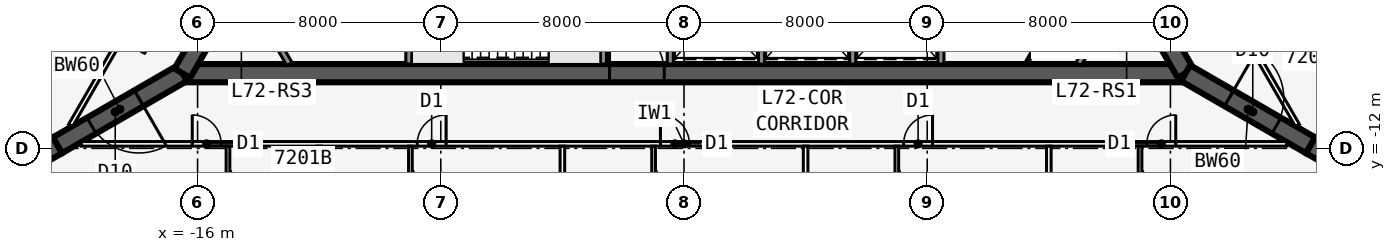
"""IFC4 building model, lengths in metres.
Left out: names, types, materials, properties, quantities, classifications, styles, units other than length and angle.
Written with IfcOpenShell. Run it as: python <this file> out.ifc"""

import sys

from ifc_helpers import new_model, si_unit, direction, frame, frame_2d, origin, place, context, subcontext, project, spatial, polyline, rectangle, outline, extrude, element, fill, save


model = new_model("IFC4")
c1 = context("Model", 3, precision=1e-05, world=origin(), true_north=direction((0.0, 1.0)))
c2 = subcontext(c1, "Body", "Model", "MODEL_VIEW")
j1 = project(units=[si_unit("LENGTHUNIT", "METRE"), si_unit("PLANEANGLEUNIT", "RADIAN")], contexts=[c1])
p1 = place(None, origin())
s1 = spatial("IfcSite", under=j1, at=p1, CompositionType="ELEMENT")
p2 = place(p1, origin())
s2 = spatial("IfcBuilding", under=s1, at=p2, CompositionType="ELEMENT")
p3 = place(p2, frame((0.0, 0.0, 271.7)))
s3 = spatial("IfcBuildingStorey", under=s2, at=p3, CompositionType="ELEMENT", Elevation=271.7)
p4 = place(p3, frame((-16.5, -9.526, 0.0), z_axis=(0.0, 0.0, 1.0), x_axis=(1.0, 0.0, 0.0)))
e1 = element("IfcWall", 1, at=p4, inside=s3, PredefinedType="SHEAR", context=c2, shape_type="SweptSolid", body=[
    extrude(rectangle(XDim=33.0, YDim=0.6, at=frame_2d((16.5, 0.0))), origin(), (0.0, 0.0, 1.0), 3.6),
])
p5 = place(p4, frame((14.05, 0.0, 0.0)))
e2 = element("IfcOpeningElement", 2, at=p5, cuts=e1, PredefinedType="OPENING", context=c2, shape_type="SweptSolid", body=[
    extrude(rectangle(XDim=1.8, YDim=2.13, at=frame_2d((0.9, 1.065))), frame((0.0, 0.31, 0.0), z_axis=(0.0, -1.0, 0.0), x_axis=(1.0, 0.0, 0.0)), (0.0, 0.0, 1.0), 0.62),
])
p6 = place(p3, frame((-9.05, -5.951, 0.0), z_axis=(0.0, 0.0, 1.0), x_axis=(0.0, -1.0, 0.0)))
e3 = element("IfcWall", 3, at=p6, inside=s3, PredefinedType="SOLIDWALL", context=c2, shape_type="SweptSolid", body=[
    extrude(rectangle(XDim=3.275, YDim=0.2, at=frame_2d((1.637, 0.0))), origin(), (0.0, 0.0, 1.0), 3.35),
])
p7 = place(p3, frame((-2.65, -5.951, 0.0), z_axis=(0.0, 0.0, 1.0), x_axis=(0.0, -1.0, 0.0)))
e4 = element("IfcWall", 4, at=p7, inside=s3, PredefinedType="SOLIDWALL", context=c2, shape_type="SweptSolid", body=[
    extrude(rectangle(XDim=3.275, YDim=0.2, at=frame_2d((1.637, 0.0))), origin(), (0.0, 0.0, 1.0), 3.35),
])
p8 = place(p7, frame((1.675, 0.0, 0.0)))
e5 = element("IfcOpeningElement", 5, at=p8, cuts=e4, PredefinedType="OPENING", context=c2, shape_type="SweptSolid", body=[
    extrude(rectangle(XDim=1.0, YDim=2.13, at=frame_2d((0.5, 1.065))), frame((0.0, 0.11, 0.0), z_axis=(0.0, -1.0, 0.0), x_axis=(1.0, 0.0, 0.0)), (0.0, 0.0, 1.0), 0.22),
])
for number, where, z_axis, x_axis in (
    (6, (-0.45, -5.951, 0.0), (0.0, 0.0, 1.0), (0.0, -1.0, 0.0)),
    (7, (2.55, -5.951, 0.0), (0.0, 0.0, 1.0), (0.0, -1.0, 0.0)),
    (8, (5.55, -5.951, 0.0), (0.0, 0.0, 1.0), (0.0, -1.0, 0.0)),
    (9, (8.45, -5.951, 0.0), (0.0, 0.0, 1.0), (0.0, -1.0, 0.0)),
):
    element("IfcWall", number, at=place(p3, frame(where, z_axis=z_axis, x_axis=x_axis)), inside=s3, PredefinedType="SOLIDWALL", context=c2, shape_type="SweptSolid", body=[
        extrude(rectangle(XDim=3.275, YDim=0.2, at=frame_2d((1.637, 0.0))), origin(), (0.0, 0.0, 1.0), 3.35),
    ])
p9 = place(p3, frame((16.5, -9.526, 0.0), z_axis=(0.0, 0.0, 1.0), x_axis=(-0.499999749417, 0.866025548458, 0.0)))
e10 = element("IfcWall", 10, at=p9, inside=s3, PredefinedType="SHEAR", context=c2, shape_type="SweptSolid", body=[
    extrude(rectangle(XDim=33.0, YDim=0.6, at=frame_2d((16.5, 0.0))), origin(), (0.0, 0.0, 1.0), 3.6),
])
p10 = place(p9, frame((14.15, 0.0, 0.0)))
e11 = element("IfcOpeningElement", 11, at=p10, cuts=e10, PredefinedType="OPENING", context=c2, shape_type="SweptSolid", body=[
    extrude(rectangle(XDim=1.8, YDim=2.13, at=frame_2d((0.9, 1.065))), frame((0.0, 0.31, 0.0), z_axis=(0.0, -1.0, 0.0), x_axis=(1.0, 0.0, 0.0)), (0.0, 0.0, 1.0), 0.62),
])
p11 = place(p9, frame((12.6, 0.0, 0.0)))
e12 = element("IfcOpeningElement", 12, at=p11, cuts=e10, PredefinedType="OPENING", context=c2, shape_type="SweptSolid", body=[
    extrude(rectangle(XDim=1.0, YDim=2.13, at=frame_2d((0.5, 1.065))), frame((0.0, 0.31, 0.0), z_axis=(0.0, -1.0, 0.0), x_axis=(1.0, 0.0, 0.0)), (0.0, 0.0, 1.0), 0.62),
])
p12 = place(p3, frame((0.0, 19.052, 0.0), z_axis=(0.0, 0.0, 1.0), x_axis=(-0.499999749417, -0.866025548458, 0.0)))
e13 = element("IfcWall", 13, at=p12, inside=s3, PredefinedType="SHEAR", context=c2, shape_type="SweptSolid", body=[
    extrude(rectangle(XDim=33.0, YDim=0.6, at=frame_2d((16.5, 0.0))), origin(), (0.0, 0.0, 1.0), 3.6),
])
p13 = place(p12, frame((14.15, 0.0, 0.0)))
e14 = element("IfcOpeningElement", 14, at=p13, cuts=e13, PredefinedType="OPENING", context=c2, shape_type="SweptSolid", body=[
    extrude(rectangle(XDim=1.8, YDim=2.13, at=frame_2d((0.9, 1.065))), frame((0.0, 0.31, 0.0), z_axis=(0.0, -1.0, 0.0), x_axis=(1.0, 0.0, 0.0)), (0.0, 0.0, 1.0), 0.62),
])
p14 = place(p12, frame((12.6, 0.0, 0.0)))
e15 = element("IfcOpeningElement", 15, at=p14, cuts=e13, PredefinedType="OPENING", context=c2, shape_type="SweptSolid", body=[
    extrude(rectangle(XDim=1.0, YDim=2.13, at=frame_2d((0.5, 1.065))), frame((0.0, 0.31, 0.0), z_axis=(0.0, -1.0, 0.0), x_axis=(1.0, 0.0, 0.0)), (0.0, 0.0, 1.0), 0.62),
])
p15 = place(p3, frame((16.5, -9.526, 0.0), z_axis=(0.0, 0.0, 1.0), x_axis=(0.866031398331, -0.499989616998, 0.0)))
e16 = element("IfcWall", 16, at=p15, inside=s3, PredefinedType="SHEAR", context=c2, shape_type="SweptSolid", body=[
    extrude(rectangle(XDim=4.746, YDim=0.6, at=frame_2d((2.373, 0.0))), origin(), (0.0, 0.0, 1.0), 3.6),
])
p16 = place(p15, frame((1.65, 0.0, 0.0)))
e17 = element("IfcOpeningElement", 17, at=p16, cuts=e16, PredefinedType="OPENING", context=c2, shape_type="SweptSolid", body=[
    extrude(rectangle(XDim=1.8, YDim=2.13, at=frame_2d((0.9, 1.065))), frame((0.0, 0.31, 0.0), z_axis=(0.0, -1.0, 0.0), x_axis=(1.0, 0.0, 0.0)), (0.0, 0.0, 1.0), 0.62),
])
p17 = place(p3, frame((20.61, -11.899, 0.0), z_axis=(0.0, 0.0, 1.0), x_axis=(0.866009537788, -0.500027479704, 0.0)))
e18 = element("IfcWall", 18, at=p17, inside=s3, PredefinedType="SHEAR", context=c2, shape_type="SweptSolid", body=[
    extrude(rectangle(XDim=1.155, YDim=0.6, at=frame_2d((0.577, 0.0))), origin(), (0.0, 0.0, 1.0), 3.6),
])
p18 = place(p3, frame((-16.5, -9.526, 0.0), z_axis=(0.0, 0.0, 1.0), x_axis=(-0.866031398331, -0.499989616998, 0.0)))
e19 = element("IfcWall", 19, at=p18, inside=s3, PredefinedType="SHEAR", context=c2, shape_type="SweptSolid", body=[
    extrude(rectangle(XDim=4.746, YDim=0.6, at=frame_2d((2.373, 0.0))), origin(), (0.0, 0.0, 1.0), 3.6),
])
p19 = place(p18, frame((1.65, 0.0, 0.0)))
e20 = element("IfcOpeningElement", 20, at=p19, cuts=e19, PredefinedType="OPENING", context=c2, shape_type="SweptSolid", body=[
    extrude(rectangle(XDim=1.8, YDim=2.13, at=frame_2d((0.9, 1.065))), frame((0.0, 0.31, 0.0), z_axis=(0.0, -1.0, 0.0), x_axis=(1.0, 0.0, 0.0)), (0.0, 0.0, 1.0), 0.62),
])
p20 = place(p3, frame((-20.61, -11.899, 0.0), z_axis=(0.0, 0.0, 1.0), x_axis=(-0.866009537788, -0.500027479704, 0.0)))
e21 = element("IfcWall", 21, at=p20, inside=s3, PredefinedType="SHEAR", context=c2, shape_type="SweptSolid", body=[
    extrude(rectangle(XDim=1.155, YDim=0.6, at=frame_2d((0.577, 0.0))), origin(), (0.0, 0.0, 1.0), 3.6),
])
p21 = place(p3, frame((18.46, -15.924, 0.0), z_axis=(0.0, 0.0, 1.0), x_axis=(0.707081252484, 0.707132308968, 0.0)))
e22 = element("IfcWall", 22, at=p21, inside=s3, PredefinedType="SOLIDWALL", context=c2, shape_type="SweptSolid", body=[
    extrude(outline(polyline([(4.782, 0.225), (4.723, 0.225), (4.375, 0.132), (4.351, 0.225), (0.0, 0.225), (0.0, -0.225), (4.782, -0.225), (4.782, 0.225)])), origin(), (0.0, 0.0, 1.0), 3.35),
])
p22 = place(p21, frame((0.75, 0.0, 0.45)))
e23 = element("IfcOpeningElement", 23, at=p22, cuts=e22, PredefinedType="OPENING", context=c2, shape_type="SweptSolid", body=[
    extrude(rectangle(XDim=3.0, YDim=2.6, at=frame_2d((1.5, 1.3))), frame((0.0, 0.235, 0.0), z_axis=(0.0, -1.0, 0.0), x_axis=(1.0, 0.0, 0.0)), (0.0, 0.0, 1.0), 0.47),
])
p23 = place(p3, frame((-21.841, -12.542, 0.0), z_axis=(0.0, 0.0, 1.0), x_axis=(0.707081252484, -0.707132308968, 0.0)))
e24 = element("IfcWall", 24, at=p23, inside=s3, PredefinedType="SOLIDWALL", context=c2, shape_type="SweptSolid", body=[
    extrude(outline(polyline([(4.782, 0.225), (0.431, 0.225), (0.406, 0.132), (0.059, 0.225), (0.0, 0.225), (0.0, -0.225), (4.782, -0.225), (4.782, 0.225)])), origin(), (0.0, 0.0, 1.0), 3.35),
])
p24 = place(p23, frame((1.031, 0.0, 0.45)))
e25 = element("IfcOpeningElement", 25, at=p24, cuts=e24, PredefinedType="OPENING", context=c2, shape_type="SweptSolid", body=[
    extrude(rectangle(XDim=3.0, YDim=2.6, at=frame_2d((1.5, 1.3))), frame((0.0, 0.235, 0.0), z_axis=(0.0, -1.0, 0.0), x_axis=(1.0, 0.0, 0.0)), (0.0, 0.0, 1.0), 0.47),
])
p25 = place(p3, frame((-19.827, -11.851, 0.0), z_axis=(0.0, 0.0, 1.0), x_axis=(1.0, 0.0, 0.0)))
e26 = element("IfcWall", 26, at=p25, inside=s3, PredefinedType="PARTITIONING", context=c2, shape_type="SweptSolid", body=[
    extrude(rectangle(XDim=39.654, YDim=0.15, at=frame_2d((19.827, 0.0))), origin(), (0.0, 0.0, 1.0), 3.35),
])
p26 = place(p25, frame((3.652, 0.0, 0.0)))
e27 = element("IfcOpeningElement", 27, at=p26, cuts=e26, PredefinedType="OPENING", context=c2, shape_type="SweptSolid", body=[
    extrude(rectangle(XDim=0.95, YDim=2.13, at=frame_2d((0.475, 1.065))), frame((0.0, 0.085, 0.0), z_axis=(0.0, -1.0, 0.0), x_axis=(1.0, 0.0, 0.0)), (0.0, 0.0, 1.0), 0.17),
])
p27 = place(p25, frame((11.052, 0.0, 0.0)))
e28 = element("IfcOpeningElement", 28, at=p27, cuts=e26, PredefinedType="OPENING", context=c2, shape_type="SweptSolid", body=[
    extrude(rectangle(XDim=0.95, YDim=2.13, at=frame_2d((0.475, 1.065))), frame((0.0, 0.085, 0.0), z_axis=(0.0, -1.0, 0.0), x_axis=(1.0, 0.0, 0.0)), (0.0, 0.0, 1.0), 0.17),
])
p28 = place(p25, frame((19.052, 0.0, 0.0)))
e29 = element("IfcOpeningElement", 29, at=p28, cuts=e26, PredefinedType="OPENING", context=c2, shape_type="SweptSolid", body=[
    extrude(rectangle(XDim=0.95, YDim=2.13, at=frame_2d((0.475, 1.065))), frame((0.0, 0.085, 0.0), z_axis=(0.0, -1.0, 0.0), x_axis=(1.0, 0.0, 0.0)), (0.0, 0.0, 1.0), 0.17),
])
p29 = place(p25, frame((27.052, 0.0, 0.0)))
e30 = element("IfcOpeningElement", 30, at=p29, cuts=e26, PredefinedType="OPENING", context=c2, shape_type="SweptSolid", body=[
    extrude(rectangle(XDim=0.95, YDim=2.13, at=frame_2d((0.475, 1.065))), frame((0.0, 0.085, 0.0), z_axis=(0.0, -1.0, 0.0), x_axis=(1.0, 0.0, 0.0)), (0.0, 0.0, 1.0), 0.17),
])
p30 = place(p25, frame((35.052, 0.0, 0.0)))
e31 = element("IfcOpeningElement", 31, at=p30, cuts=e26, PredefinedType="OPENING", context=c2, shape_type="SweptSolid", body=[
    extrude(rectangle(XDim=0.95, YDim=2.13, at=frame_2d((0.475, 1.065))), frame((0.0, 0.085, 0.0), z_axis=(0.0, -1.0, 0.0), x_axis=(1.0, 0.0, 0.0)), (0.0, 0.0, 1.0), 0.17),
])
p31 = place(p3, frame((-12.0, -11.926, 0.0), z_axis=(0.0, 0.0, 1.0), x_axis=(0.0, -1.0, 0.0)))
e32 = element("IfcWall", 32, at=p31, inside=s3, PredefinedType="PARTITIONING", context=c2, shape_type="SweptSolid", body=[
    extrude(rectangle(XDim=5.559, YDim=0.15, at=frame_2d((2.779, 0.0))), origin(), (0.0, 0.0, 1.0), 2.301),
])
for number, where, z_axis, x_axis in (
    (33, (-4.0, -11.926, 0.0), (0.0, 0.0, 1.0), (0.0, -1.0, 0.0)),
    (34, (4.0, -11.926, 0.0), (0.0, 0.0, 1.0), (0.0, -1.0, 0.0)),
):
    element("IfcWall", number, at=place(p3, frame(where, z_axis=z_axis, x_axis=x_axis)), inside=s3, PredefinedType="PARTITIONING", context=c2, shape_type="SweptSolid", body=[
        extrude(rectangle(XDim=6.854, YDim=0.15, at=frame_2d((3.427, 0.0))), origin(), (0.0, 0.0, 1.0), 3.35),
    ])
p32 = place(p3, frame((12.0, -11.926, 0.0), z_axis=(0.0, 0.0, 1.0), x_axis=(0.0, -1.0, 0.0)))
e35 = element("IfcWall", 35, at=p32, inside=s3, PredefinedType="PARTITIONING", context=c2, shape_type="SweptSolid", body=[
    extrude(rectangle(XDim=5.559, YDim=0.15, at=frame_2d((2.779, 0.0))), origin(), (0.0, 0.0, 1.0), 2.301),
])
p33 = place(p3, frame((-15.0, -11.926, 0.0), z_axis=(0.0, 0.0, 1.0), x_axis=(0.0, -1.0, 0.0)))
e36 = element("IfcWall", 36, at=p33, inside=s3, PredefinedType="PLUMBINGWALL", context=c2, shape_type="SweptSolid", body=[
    extrude(rectangle(XDim=2.74, YDim=0.12, at=frame_2d((1.37, 0.0))), origin(), (0.0, 0.0, 1.0), 3.35),
])
p34 = place(p33, frame((1.55, 0.0, 0.0)))
e37 = element("IfcOpeningElement", 37, at=p34, cuts=e36, PredefinedType="OPENING", context=c2, shape_type="SweptSolid", body=[
    extrude(rectangle(XDim=0.9, YDim=2.13, at=frame_2d((0.45, 1.065))), frame((0.0, 0.07, 0.0), z_axis=(0.0, -1.0, 0.0), x_axis=(1.0, 0.0, 0.0)), (0.0, 0.0, 1.0), 0.14),
])
p35 = place(p3, frame((-9.0, -11.926, 0.0), z_axis=(0.0, 0.0, 1.0), x_axis=(0.0, -1.0, 0.0)))
e38 = element("IfcWall", 38, at=p35, inside=s3, PredefinedType="PLUMBINGWALL", context=c2, shape_type="SweptSolid", body=[
    extrude(rectangle(XDim=2.74, YDim=0.12, at=frame_2d((1.37, 0.0))), origin(), (0.0, 0.0, 1.0), 3.35),
])
p36 = place(p35, frame((1.55, 0.0, 0.0)))
e39 = element("IfcOpeningElement", 39, at=p36, cuts=e38, PredefinedType="OPENING", context=c2, shape_type="SweptSolid", body=[
    extrude(rectangle(XDim=0.9, YDim=2.13, at=frame_2d((0.45, 1.065))), frame((0.0, 0.07, 0.0), z_axis=(0.0, -1.0, 0.0), x_axis=(1.0, 0.0, 0.0)), (0.0, 0.0, 1.0), 0.14),
])
p37 = place(p3, frame((-1.0, -11.926, 0.0), z_axis=(0.0, 0.0, 1.0), x_axis=(0.0, -1.0, 0.0)))
e40 = element("IfcWall", 40, at=p37, inside=s3, PredefinedType="PLUMBINGWALL", context=c2, shape_type="SweptSolid", body=[
    extrude(rectangle(XDim=2.74, YDim=0.12, at=frame_2d((1.37, 0.0))), origin(), (0.0, 0.0, 1.0), 3.35),
])
p38 = place(p37, frame((1.55, 0.0, 0.0)))
e41 = element("IfcOpeningElement", 41, at=p38, cuts=e40, PredefinedType="OPENING", context=c2, shape_type="SweptSolid", body=[
    extrude(rectangle(XDim=0.9, YDim=2.13, at=frame_2d((0.45, 1.065))), frame((0.0, 0.07, 0.0), z_axis=(0.0, -1.0, 0.0), x_axis=(1.0, 0.0, 0.0)), (0.0, 0.0, 1.0), 0.14),
])
p39 = place(p3, frame((7.0, -11.926, 0.0), z_axis=(0.0, 0.0, 1.0), x_axis=(0.0, -1.0, 0.0)))
e42 = element("IfcWall", 42, at=p39, inside=s3, PredefinedType="PLUMBINGWALL", context=c2, shape_type="SweptSolid", body=[
    extrude(rectangle(XDim=2.74, YDim=0.12, at=frame_2d((1.37, 0.0))), origin(), (0.0, 0.0, 1.0), 2.309),
])
p40 = place(p39, frame((1.55, 0.0, 0.0)))
e43 = element("IfcOpeningElement", 43, at=p40, cuts=e42, PredefinedType="OPENING", context=c2, shape_type="SweptSolid", body=[
    extrude(rectangle(XDim=0.9, YDim=2.13, at=frame_2d((0.45, 1.065))), frame((0.0, 0.07, 0.0), z_axis=(0.0, -1.0, 0.0), x_axis=(1.0, 0.0, 0.0)), (0.0, 0.0, 1.0), 0.14),
])
p41 = place(p3, frame((15.0, -11.926, 0.0), z_axis=(0.0, 0.0, 1.0), x_axis=(0.0, -1.0, 0.0)))
e44 = element("IfcWall", 44, at=p41, inside=s3, PredefinedType="PLUMBINGWALL", context=c2, shape_type="SweptSolid", body=[
    extrude(rectangle(XDim=2.74, YDim=0.12, at=frame_2d((1.37, 0.0))), origin(), (0.0, 0.0, 1.0), 3.35),
])
p42 = place(p41, frame((1.55, 0.0, 0.0)))
e45 = element("IfcOpeningElement", 45, at=p42, cuts=e44, PredefinedType="OPENING", context=c2, shape_type="SweptSolid", body=[
    extrude(rectangle(XDim=0.9, YDim=2.13, at=frame_2d((0.45, 1.065))), frame((0.0, 0.07, 0.0), z_axis=(0.0, -1.0, 0.0), x_axis=(1.0, 0.0, 0.0)), (0.0, 0.0, 1.0), 0.14),
])
p43 = place(p3, frame((20.177, -11.245, 0.0), z_axis=(0.0, 0.0, 1.0), x_axis=(-0.499998875317, 0.866026053119, 0.0)))
e46 = element("IfcWall", 46, at=p43, inside=s3, PredefinedType="PARTITIONING", context=c2, shape_type="SweptSolid", body=[
    extrude(rectangle(XDim=39.654, YDim=0.15, at=frame_2d((19.827, 0.0))), origin(), (0.0, 0.0, 1.0), 3.35),
])
p44 = place(p43, frame((11.352, 0.0, 0.0)))
e47 = element("IfcOpeningElement", 47, at=p44, cuts=e46, PredefinedType="OPENING", context=c2, shape_type="SweptSolid", body=[
    extrude(rectangle(XDim=0.95, YDim=2.13, at=frame_2d((0.475, 1.065))), frame((0.0, 0.085, 0.0), z_axis=(0.0, -1.0, 0.0), x_axis=(1.0, 0.0, 0.0)), (0.0, 0.0, 1.0), 0.17),
])
p45 = place(p3, frame((-0.35, 23.096, 0.0), z_axis=(0.0, 0.0, 1.0), x_axis=(-0.499998875317, -0.866026053119, 0.0)))
e48 = element("IfcWall", 48, at=p45, inside=s3, PredefinedType="PARTITIONING", context=c2, shape_type="SweptSolid", body=[
    extrude(rectangle(XDim=39.654, YDim=0.15, at=frame_2d((19.827, 0.0))), origin(), (0.0, 0.0, 1.0), 3.35),
])
p46 = place(p45, frame((3.272, 0.0, 0.0)))
e49 = element("IfcOpeningElement", 49, at=p46, cuts=e48, PredefinedType="OPENING", context=c2, shape_type="SweptSolid", body=[
    extrude(rectangle(XDim=0.95, YDim=2.13, at=frame_2d((0.475, 1.065))), frame((0.0, 0.085, 0.0), z_axis=(0.0, -1.0, 0.0), x_axis=(1.0, 0.0, 0.0)), (0.0, 0.0, 1.0), 0.17),
])
p47 = place(p45, frame((19.052, 0.0, 0.0)))
e50 = element("IfcOpeningElement", 50, at=p47, cuts=e48, PredefinedType="OPENING", context=c2, shape_type="SweptSolid", body=[
    extrude(rectangle(XDim=0.95, YDim=2.13, at=frame_2d((0.475, 1.065))), frame((0.0, 0.085, 0.0), z_axis=(0.0, -1.0, 0.0), x_axis=(1.0, 0.0, 0.0)), (0.0, 0.0, 1.0), 0.17),
])
p48 = place(p45, frame((35.432, 0.0, 0.0)))
e51 = element("IfcOpeningElement", 51, at=p48, cuts=e48, PredefinedType="OPENING", context=c2, shape_type="SweptSolid", body=[
    extrude(rectangle(XDim=0.95, YDim=2.13, at=frame_2d((0.475, 1.065))), frame((0.0, 0.085, 0.0), z_axis=(0.0, -1.0, 0.0), x_axis=(1.0, 0.0, 0.0)), (0.0, 0.0, 1.0), 0.17),
])
p49 = place(p3, frame((14.479, -6.626, 0.0), z_axis=(0.0, 0.0, 1.0), x_axis=(-0.499952404951, -0.866052881055, 0.0)))
e52 = element("IfcWall", 52, at=p49, inside=s3, PredefinedType="SOLIDWALL", context=c2, shape_type="SweptSolid", body=[
    extrude(rectangle(XDim=3.002, YDim=0.2, at=frame_2d((1.501, 0.0))), origin(), (0.0, 0.0, 1.0), 3.35),
])
p50 = place(p3, frame((13.613, -5.126, 0.0), z_axis=(0.0, 0.0, 1.0), x_axis=(-0.499999210213, -0.866025859768, 0.0)))
e53 = element("IfcWall", 53, at=p50, inside=s3, PredefinedType="PARTITIONING", context=c2, shape_type="SweptSolid", body=[
    extrude(rectangle(XDim=4.734, YDim=0.1, at=frame_2d((2.367, 0.0))), origin(), (0.0, 0.0, 1.0), 3.35),
])
p51 = place(p50, frame((1.917, 0.0, 0.0)))
e54 = element("IfcOpeningElement", 54, at=p51, cuts=e53, PredefinedType="OPENING", context=c2, shape_type="SweptSolid", body=[
    extrude(rectangle(XDim=0.9, YDim=2.13, at=frame_2d((0.45, 1.065))), frame((0.0, 0.06, 0.0), z_axis=(0.0, -1.0, 0.0), x_axis=(1.0, 0.0, 0.0)), (0.0, 0.0, 1.0), 0.12),
])
p52 = place(p3, frame((-12.978, -9.226, 0.0), z_axis=(0.0, 0.0, 1.0), x_axis=(-0.499952404951, 0.866052881055, 0.0)))
e55 = element("IfcWall", 55, at=p52, inside=s3, PredefinedType="SOLIDWALL", context=c2, shape_type="SweptSolid", body=[
    extrude(rectangle(XDim=3.002, YDim=0.2, at=frame_2d((1.501, 0.0))), origin(), (0.0, 0.0, 1.0), 3.35),
])
p53 = place(p26, origin())
e56 = element("IfcDoor", 56, at=p53, inside=s3, OperationType="SINGLE_SWING_LEFT", PredefinedType="DOOR", context=c2, shape_type="SweptSolid", body=[
    extrude(rectangle(XDim=0.95, YDim=2.13, at=frame_2d((0.475, 1.065))), frame((0.0, 0.025, 0.0), z_axis=(0.0, -1.0, 0.0), x_axis=(1.0, 0.0, 0.0)), (0.0, 0.0, 1.0), 0.05),
])
fill(e27, e56)
p54 = place(p27, origin())
e57 = element("IfcDoor", 57, at=p54, inside=s3, OperationType="SINGLE_SWING_RIGHT", PredefinedType="DOOR", context=c2, shape_type="SweptSolid", body=[
    extrude(rectangle(XDim=0.95, YDim=2.13, at=frame_2d((0.475, 1.065))), frame((0.0, 0.025, 0.0), z_axis=(0.0, -1.0, 0.0), x_axis=(1.0, 0.0, 0.0)), (0.0, 0.0, 1.0), 0.05),
])
fill(e28, e57)
p55 = place(p28, origin())
e58 = element("IfcDoor", 58, at=p55, inside=s3, OperationType="SINGLE_SWING_LEFT", PredefinedType="DOOR", context=c2, shape_type="SweptSolid", body=[
    extrude(rectangle(XDim=0.95, YDim=2.13, at=frame_2d((0.475, 1.065))), frame((0.0, 0.025, 0.0), z_axis=(0.0, -1.0, 0.0), x_axis=(1.0, 0.0, 0.0)), (0.0, 0.0, 1.0), 0.05),
])
fill(e29, e58)
p56 = place(p29, origin())
e59 = element("IfcDoor", 59, at=p56, inside=s3, OperationType="SINGLE_SWING_RIGHT", PredefinedType="DOOR", context=c2, shape_type="SweptSolid", body=[
    extrude(rectangle(XDim=0.95, YDim=2.13, at=frame_2d((0.475, 1.065))), frame((0.0, 0.025, 0.0), z_axis=(0.0, -1.0, 0.0), x_axis=(1.0, 0.0, 0.0)), (0.0, 0.0, 1.0), 0.05),
])
fill(e30, e59)
p57 = place(p30, origin())
e60 = element("IfcDoor", 60, at=p57, inside=s3, OperationType="SINGLE_SWING_RIGHT", PredefinedType="DOOR", context=c2, shape_type="SweptSolid", body=[
    extrude(rectangle(XDim=0.95, YDim=2.13, at=frame_2d((0.475, 1.065))), frame((0.0, 0.025, 0.0), z_axis=(0.0, -1.0, 0.0), x_axis=(1.0, 0.0, 0.0)), (0.0, 0.0, 1.0), 0.05),
])
fill(e31, e60)
p58 = place(p5, origin())
e61 = element("IfcDoor", 61, at=p58, inside=s3, OperationType="DOUBLE_DOOR_SINGLE_SWING", PredefinedType="DOOR", context=c2, shape_type="SweptSolid", body=[
    extrude(rectangle(XDim=1.8, YDim=2.13, at=frame_2d((0.9, 1.065))), frame((0.0, 0.025, 0.0), z_axis=(0.0, -1.0, 0.0), x_axis=(1.0, 0.0, 0.0)), (0.0, 0.0, 1.0), 0.05),
])
fill(e2, e61)
p59 = place(p16, origin())
e62 = element("IfcDoor", 62, at=p59, inside=s3, OperationType="DOUBLE_DOOR_DOUBLE_SWING", PredefinedType="DOOR", context=c2, shape_type="SweptSolid", body=[
    extrude(rectangle(XDim=1.8, YDim=2.13, at=frame_2d((0.9, 1.065))), frame((0.0, 0.025, 0.0), z_axis=(0.0, -1.0, 0.0), x_axis=(1.0, 0.0, 0.0)), (0.0, 0.0, 1.0), 0.05),
])
fill(e17, e62)
p60 = place(p19, origin())
e63 = element("IfcDoor", 63, at=p60, inside=s3, OperationType="DOUBLE_DOOR_DOUBLE_SWING", PredefinedType="DOOR", context=c2, shape_type="SweptSolid", body=[
    extrude(rectangle(XDim=1.8, YDim=2.13, at=frame_2d((0.9, 1.065))), frame((0.0, 0.025, 0.0), z_axis=(0.0, -1.0, 0.0), x_axis=(1.0, 0.0, 0.0)), (0.0, 0.0, 1.0), 0.05),
])
fill(e20, e63)
save(model, sys.argv[1])
